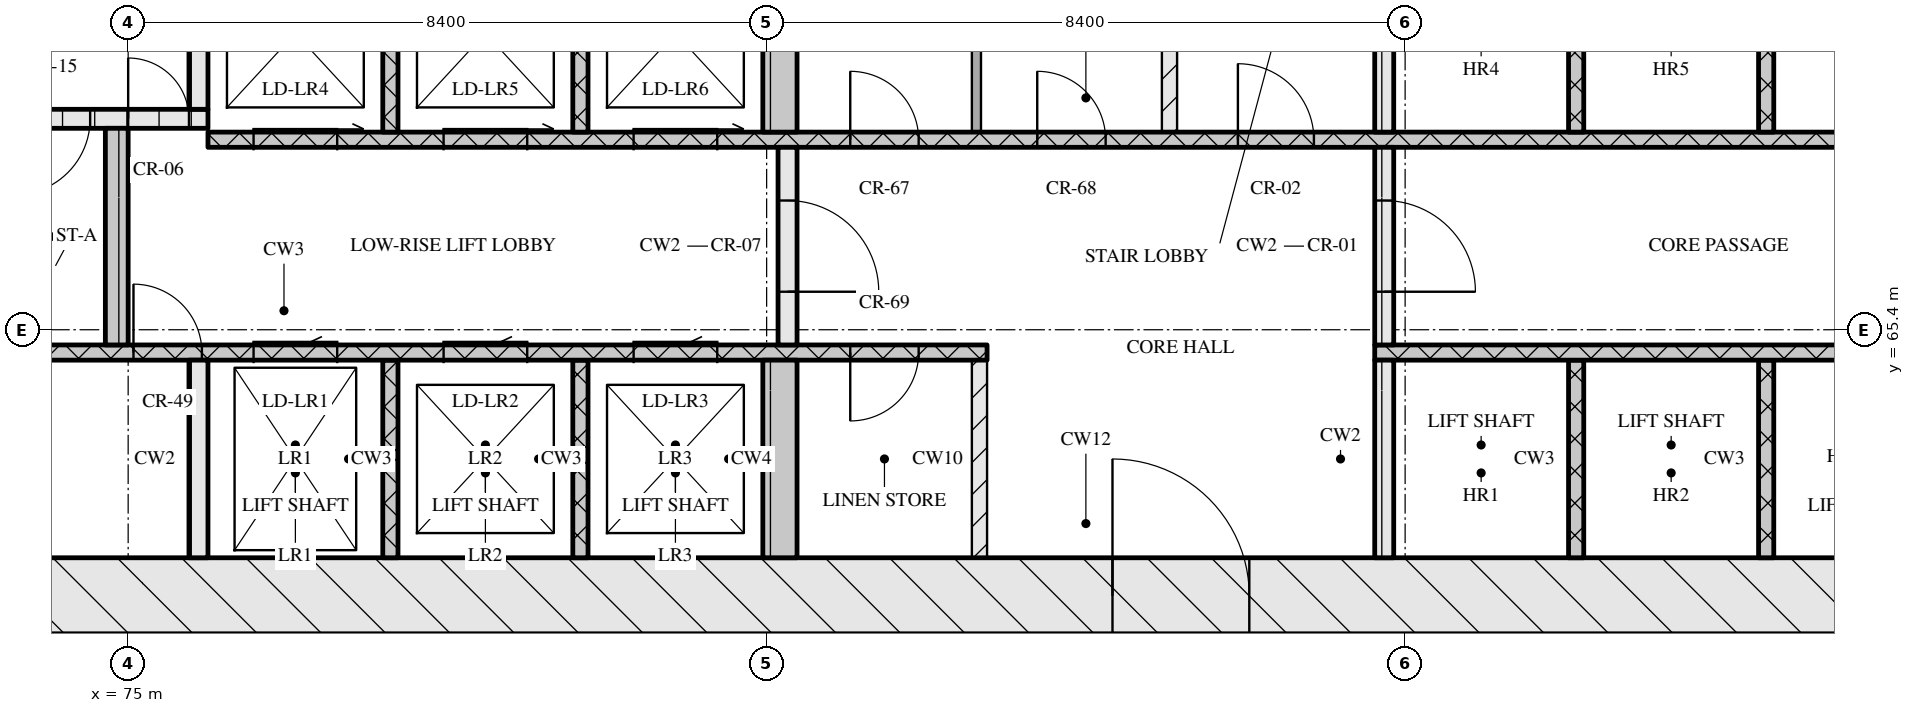
"""IFC4 building model, lengths in metres.
Left out: names, types, materials, properties, quantities, classifications, styles, units other than length and angle.
Written with IfcOpenShell. Run it as: python <this file> out.ifc"""

import sys

from ifc_helpers import new_model, si_unit, direction, frame, frame_2d, origin, place, context, subcontext, project, spatial, rectangle, extrude, element, fill, save


model = new_model("IFC4")
c1 = context("Model", 3, precision=1e-05, world=origin(), true_north=direction((0.0, 1.0)))
c2 = subcontext(c1, "Body", "Model", "MODEL_VIEW")
j1 = project(units=[si_unit("LENGTHUNIT", "METRE"), si_unit("PLANEANGLEUNIT", "RADIAN")], contexts=[c1])
p1 = place(None, origin())
s1 = spatial("IfcSite", under=j1, at=p1, CompositionType="ELEMENT")
p2 = place(p1, origin())
s2 = spatial("IfcBuilding", under=s1, at=p2, CompositionType="ELEMENT")
p3 = place(p2, frame((0.0, 0.0, 84.0)))
s3 = spatial("IfcBuildingStorey", under=s2, at=p3, CompositionType="ELEMENT", Elevation=84.0)
p4 = place(p3, frame((66.8, 61.9, 0.0), z_axis=(0.0, 0.0, 1.0), x_axis=(1.0, 0.0, 0.0)))
e1 = element("IfcWall", 1, at=p4, inside=s3, PredefinedType="SOLIDWALL", context=c2, shape_type="SweptSolid", body=[
    extrude(rectangle(XDim=41.6, YDim=1.0, at=frame_2d((20.8, 0.0))), origin(), (0.0, 0.0, 1.0), 10.97),
])
p5 = place(p4, frame((21.15, 0.0, 0.0)))
e2 = element("IfcOpeningElement", 2, at=p5, cuts=e1, PredefinedType="OPENING", context=c2, shape_type="SweptSolid", body=[
    extrude(rectangle(XDim=1.8, YDim=2.1, at=frame_2d((0.9, 1.05))), frame((0.0, 0.51, 0.0), z_axis=(0.0, -1.0, 0.0), x_axis=(1.0, 0.0, 0.0)), (0.0, 0.0, 1.0), 1.02),
])
p6 = place(p3, frame((75.925, 62.4, 0.0), z_axis=(0.0, 0.0, 1.0), x_axis=(0.0, 1.0, 0.0)))
e3 = element("IfcWall", 3, at=p6, inside=s3, PredefinedType="SOLIDWALL", context=c2, shape_type="SweptSolid", body=[
    extrude(rectangle(XDim=2.6, YDim=0.25, at=frame_2d((1.3, 0.0))), origin(), (0.0, 0.0, 1.0), 10.97),
])
for number, where, z_axis, x_axis in (
    (4, (78.45, 62.4, 0.0), (0.0, 0.0, 1.0), (0.0, 1.0, 0.0)),
    (5, (80.95, 62.4, 0.0), (0.0, 0.0, 1.0), (0.0, 1.0, 0.0)),
):
    element("IfcWall", number, at=place(p3, frame(where, z_axis=z_axis, x_axis=x_axis)), inside=s3, PredefinedType="SOLIDWALL", context=c2, shape_type="SweptSolid", body=[
        extrude(rectangle(XDim=2.6, YDim=0.2, at=frame_2d((1.3, 0.0))), origin(), (0.0, 0.0, 1.0), 10.97),
    ])
p7 = place(p3, frame((83.575, 62.4, 0.0), z_axis=(0.0, 0.0, 1.0), x_axis=(0.0, 1.0, 0.0)))
e6 = element("IfcWall", 6, at=p7, inside=s3, PredefinedType="SOLIDWALL", context=c2, shape_type="SweptSolid", body=[
    extrude(rectangle(XDim=2.6, YDim=0.45, at=frame_2d((1.3, 0.0))), origin(), (0.0, 0.0, 1.0), 10.97),
])
p8 = place(p3, frame((86.2, 62.4, 0.0), z_axis=(0.0, 0.0, 1.0), x_axis=(0.0, 1.0, 0.0)))
e7 = element("IfcWall", 7, at=p8, inside=s3, PredefinedType="PARTITIONING", context=c2, shape_type="SweptSolid", body=[
    extrude(rectangle(XDim=2.6, YDim=0.2, at=frame_2d((1.3, 0.0))), origin(), (0.0, 0.0, 1.0), 10.97),
])
p9 = place(p3, frame((91.525, 62.4, 0.0), z_axis=(0.0, 0.0, 1.0), x_axis=(0.0, 1.0, 0.0)))
e8 = element("IfcWall", 8, at=p9, inside=s3, PredefinedType="SOLIDWALL", context=c2, shape_type="SweptSolid", body=[
    extrude(rectangle(XDim=2.6, YDim=0.25, at=frame_2d((1.3, 0.0))), origin(), (0.0, 0.0, 1.0), 10.97),
])
for number, where, z_axis, x_axis in (
    (9, (94.05, 62.4, 0.0), (0.0, 0.0, 1.0), (0.0, 1.0, 0.0)),
    (10, (96.55, 62.4, 0.0), (0.0, 0.0, 1.0), (0.0, 1.0, 0.0)),
):
    element("IfcWall", number, at=place(p3, frame(where, z_axis=z_axis, x_axis=x_axis)), inside=s3, PredefinedType="SOLIDWALL", context=c2, shape_type="SweptSolid", body=[
        extrude(rectangle(XDim=2.6, YDim=0.2, at=frame_2d((1.3, 0.0))), origin(), (0.0, 0.0, 1.0), 10.97),
    ])
p10 = place(p3, frame((67.8, 65.1, 0.0), z_axis=(0.0, 0.0, 1.0), x_axis=(1.0, 0.0, 0.0)))
e11 = element("IfcWall", 11, at=p10, inside=s3, PredefinedType="SOLIDWALL", context=c2, shape_type="SweptSolid", body=[
    extrude(rectangle(XDim=18.5, YDim=0.2, at=frame_2d((9.25, 0.0))), origin(), (0.0, 0.0, 1.0), 10.97),
])
p11 = place(p10, frame((7.27, 0.0, 0.0)))
e12 = element("IfcOpeningElement", 12, at=p11, cuts=e11, PredefinedType="OPENING", context=c2, shape_type="SweptSolid", body=[
    extrude(rectangle(XDim=0.9, YDim=2.1, at=frame_2d((0.45, 1.05))), frame((0.0, 0.11, 0.0), z_axis=(0.0, -1.0, 0.0), x_axis=(1.0, 0.0, 0.0)), (0.0, 0.0, 1.0), 0.22),
])
p12 = place(p10, frame((8.85, 0.0, 0.0)))
e13 = element("IfcOpeningElement", 13, at=p12, cuts=e11, PredefinedType="OPENING", context=c2, shape_type="SweptSolid", body=[
    extrude(rectangle(XDim=1.1, YDim=2.1, at=frame_2d((0.55, 1.05))), frame((0.0, 0.11, 0.0), z_axis=(0.0, -1.0, 0.0), x_axis=(1.0, 0.0, 0.0)), (0.0, 0.0, 1.0), 0.22),
])
p13 = place(p10, frame((11.35, 0.0, 0.0)))
e14 = element("IfcOpeningElement", 14, at=p13, cuts=e11, PredefinedType="OPENING", context=c2, shape_type="SweptSolid", body=[
    extrude(rectangle(XDim=1.1, YDim=2.1, at=frame_2d((0.55, 1.05))), frame((0.0, 0.11, 0.0), z_axis=(0.0, -1.0, 0.0), x_axis=(1.0, 0.0, 0.0)), (0.0, 0.0, 1.0), 0.22),
])
p14 = place(p10, frame((13.85, 0.0, 0.0)))
e15 = element("IfcOpeningElement", 15, at=p14, cuts=e11, PredefinedType="OPENING", context=c2, shape_type="SweptSolid", body=[
    extrude(rectangle(XDim=1.1, YDim=2.1, at=frame_2d((0.55, 1.05))), frame((0.0, 0.11, 0.0), z_axis=(0.0, -1.0, 0.0), x_axis=(1.0, 0.0, 0.0)), (0.0, 0.0, 1.0), 0.22),
])
p15 = place(p10, frame((16.7, 0.0, 0.0)))
e16 = element("IfcOpeningElement", 16, at=p15, cuts=e11, PredefinedType="OPENING", context=c2, shape_type="SweptSolid", body=[
    extrude(rectangle(XDim=0.9, YDim=2.1, at=frame_2d((0.45, 1.05))), frame((0.0, 0.11, 0.0), z_axis=(0.0, -1.0, 0.0), x_axis=(1.0, 0.0, 0.0)), (0.0, 0.0, 1.0), 0.22),
])
p16 = place(p3, frame((91.4, 65.1, 0.0), z_axis=(0.0, 0.0, 1.0), x_axis=(1.0, 0.0, 0.0)))
e17 = element("IfcWall", 17, at=p16, inside=s3, PredefinedType="SOLIDWALL", context=c2, shape_type="SweptSolid", body=[
    extrude(rectangle(XDim=16.0, YDim=0.2, at=frame_2d((8.0, 0.0))), origin(), (0.0, 0.0, 1.0), 10.97),
])
p17 = place(p16, frame((7.83, 0.0, 0.0)))
e18 = element("IfcOpeningElement", 18, at=p17, cuts=e17, PredefinedType="OPENING", context=c2, shape_type="SweptSolid", body=[
    extrude(rectangle(XDim=0.9, YDim=2.1, at=frame_2d((0.45, 1.05))), frame((0.0, 0.11, 0.0), z_axis=(0.0, -1.0, 0.0), x_axis=(1.0, 0.0, 0.0)), (0.0, 0.0, 1.0), 0.22),
])
p18 = place(p3, frame((74.85, 65.2, 0.0), z_axis=(0.0, 0.0, 1.0), x_axis=(0.0, 1.0, 0.0)))
e19 = element("IfcWall", 19, at=p18, inside=s3, PredefinedType="SOLIDWALL", context=c2, shape_type="SweptSolid", body=[
    extrude(rectangle(XDim=2.85, YDim=0.3, at=frame_2d((1.425, 0.0))), origin(), (0.0, 0.0, 1.0), 10.97),
])
p19 = place(p3, frame((83.675, 65.2, 0.0), z_axis=(0.0, 0.0, 1.0), x_axis=(0.0, 1.0, 0.0)))
e20 = element("IfcWall", 20, at=p19, inside=s3, PredefinedType="SOLIDWALL", context=c2, shape_type="SweptSolid", body=[
    extrude(rectangle(XDim=2.6, YDim=0.25, at=frame_2d((1.3, 0.0))), origin(), (0.0, 0.0, 1.0), 10.97),
])
p20 = place(p19, frame((0.7, 0.0, 0.0)))
e21 = element("IfcOpeningElement", 21, at=p20, cuts=e20, PredefinedType="OPENING", context=c2, shape_type="SweptSolid", body=[
    extrude(rectangle(XDim=1.2, YDim=2.1, at=frame_2d((0.6, 1.05))), frame((0.0, 0.135, 0.0), z_axis=(0.0, -1.0, 0.0), x_axis=(1.0, 0.0, 0.0)), (0.0, 0.0, 1.0), 0.27),
])
p21 = place(p3, frame((91.525, 65.2, 0.0), z_axis=(0.0, 0.0, 1.0), x_axis=(0.0, 1.0, 0.0)))
e22 = element("IfcWall", 22, at=p21, inside=s3, PredefinedType="SOLIDWALL", context=c2, shape_type="SweptSolid", body=[
    extrude(rectangle(XDim=2.6, YDim=0.25, at=frame_2d((1.3, 0.0))), origin(), (0.0, 0.0, 1.0), 10.97),
])
p22 = place(p21, frame((0.7, 0.0, 0.0)))
e23 = element("IfcOpeningElement", 23, at=p22, cuts=e22, PredefinedType="OPENING", context=c2, shape_type="SweptSolid", body=[
    extrude(rectangle(XDim=1.2, YDim=2.1, at=frame_2d((0.6, 1.05))), frame((0.0, 0.135, 0.0), z_axis=(0.0, -1.0, 0.0), x_axis=(1.0, 0.0, 0.0)), (0.0, 0.0, 1.0), 0.27),
])
p23 = place(p3, frame((76.05, 67.9, 0.0), z_axis=(0.0, 0.0, 1.0), x_axis=(1.0, 0.0, 0.0)))
e24 = element("IfcWall", 24, at=p23, inside=s3, PredefinedType="SOLIDWALL", context=c2, shape_type="SweptSolid", body=[
    extrude(rectangle(XDim=23.1, YDim=0.2, at=frame_2d((11.55, 0.0))), origin(), (0.0, 0.0, 1.0), 10.97),
])
p24 = place(p23, frame((0.6, 0.0, 0.0)))
e25 = element("IfcOpeningElement", 25, at=p24, cuts=e24, PredefinedType="OPENING", context=c2, shape_type="SweptSolid", body=[
    extrude(rectangle(XDim=1.1, YDim=2.1, at=frame_2d((0.55, 1.05))), frame((0.0, 0.11, 0.0), z_axis=(0.0, -1.0, 0.0), x_axis=(1.0, 0.0, 0.0)), (0.0, 0.0, 1.0), 0.22),
])
p25 = place(p23, frame((3.1, 0.0, 0.0)))
e26 = element("IfcOpeningElement", 26, at=p25, cuts=e24, PredefinedType="OPENING", context=c2, shape_type="SweptSolid", body=[
    extrude(rectangle(XDim=1.1, YDim=2.1, at=frame_2d((0.55, 1.05))), frame((0.0, 0.11, 0.0), z_axis=(0.0, -1.0, 0.0), x_axis=(1.0, 0.0, 0.0)), (0.0, 0.0, 1.0), 0.22),
])
p26 = place(p23, frame((5.6, 0.0, 0.0)))
e27 = element("IfcOpeningElement", 27, at=p26, cuts=e24, PredefinedType="OPENING", context=c2, shape_type="SweptSolid", body=[
    extrude(rectangle(XDim=1.1, YDim=2.1, at=frame_2d((0.55, 1.05))), frame((0.0, 0.11, 0.0), z_axis=(0.0, -1.0, 0.0), x_axis=(1.0, 0.0, 0.0)), (0.0, 0.0, 1.0), 0.22),
])
p27 = place(p23, frame((8.45, 0.0, 0.0)))
e28 = element("IfcOpeningElement", 28, at=p27, cuts=e24, PredefinedType="OPENING", context=c2, shape_type="SweptSolid", body=[
    extrude(rectangle(XDim=0.9, YDim=2.1, at=frame_2d((0.45, 1.05))), frame((0.0, 0.11, 0.0), z_axis=(0.0, -1.0, 0.0), x_axis=(1.0, 0.0, 0.0)), (0.0, 0.0, 1.0), 0.22),
])
p28 = place(p23, frame((10.91, 0.0, 0.0)))
e29 = element("IfcOpeningElement", 29, at=p28, cuts=e24, PredefinedType="OPENING", context=c2, shape_type="SweptSolid", body=[
    extrude(rectangle(XDim=0.9, YDim=2.1, at=frame_2d((0.45, 1.05))), frame((0.0, 0.11, 0.0), z_axis=(0.0, -1.0, 0.0), x_axis=(1.0, 0.0, 0.0)), (0.0, 0.0, 1.0), 0.22),
])
p29 = place(p23, frame((13.55, 0.0, 0.0)))
e30 = element("IfcOpeningElement", 30, at=p29, cuts=e24, PredefinedType="OPENING", context=c2, shape_type="SweptSolid", body=[
    extrude(rectangle(XDim=1.0, YDim=2.1, at=frame_2d((0.5, 1.05))), frame((0.0, 0.11, 0.0), z_axis=(0.0, -1.0, 0.0), x_axis=(1.0, 0.0, 0.0)), (0.0, 0.0, 1.0), 0.22),
])
for number, where, z_axis, x_axis in (
    (31, (78.45, 68.0, 0.0), (0.0, 0.0, 1.0), (0.0, 1.0, 0.0)),
    (32, (80.95, 68.0, 0.0), (0.0, 0.0, 1.0), (0.0, 1.0, 0.0)),
):
    element("IfcWall", number, at=place(p3, frame(where, z_axis=z_axis, x_axis=x_axis)), inside=s3, PredefinedType="SOLIDWALL", context=c2, shape_type="SweptSolid", body=[
        extrude(rectangle(XDim=2.6, YDim=0.2, at=frame_2d((1.3, 0.0))), origin(), (0.0, 0.0, 1.0), 10.97),
    ])
p30 = place(p3, frame((83.575, 68.0, 0.0), z_axis=(0.0, 0.0, 1.0), x_axis=(0.0, 1.0, 0.0)))
e33 = element("IfcWall", 33, at=p30, inside=s3, PredefinedType="SOLIDWALL", context=c2, shape_type="SweptSolid", body=[
    extrude(rectangle(XDim=2.6, YDim=0.45, at=frame_2d((1.3, 0.0))), origin(), (0.0, 0.0, 1.0), 10.97),
])
p31 = place(p3, frame((86.16, 68.0, 0.0), z_axis=(0.0, 0.0, 1.0), x_axis=(0.0, 1.0, 0.0)))
e34 = element("IfcWall", 34, at=p31, inside=s3, PredefinedType="PARTITIONING", context=c2, shape_type="SweptSolid", body=[
    extrude(rectangle(XDim=2.6, YDim=0.12, at=frame_2d((1.3, 0.0))), origin(), (0.0, 0.0, 1.0), 10.97),
])
p32 = place(p3, frame((88.7, 68.0, 0.0), z_axis=(0.0, 0.0, 1.0), x_axis=(0.0, 1.0, 0.0)))
e35 = element("IfcWall", 35, at=p32, inside=s3, PredefinedType="PARTITIONING", context=c2, shape_type="SweptSolid", body=[
    extrude(rectangle(XDim=2.6, YDim=0.2, at=frame_2d((1.3, 0.0))), origin(), (0.0, 0.0, 1.0), 10.97),
])
p33 = place(p3, frame((91.525, 68.0, 0.0), z_axis=(0.0, 0.0, 1.0), x_axis=(0.0, 1.0, 0.0)))
e36 = element("IfcWall", 36, at=p33, inside=s3, PredefinedType="SOLIDWALL", context=c2, shape_type="SweptSolid", body=[
    extrude(rectangle(XDim=2.6, YDim=0.25, at=frame_2d((1.3, 0.0))), origin(), (0.0, 0.0, 1.0), 10.97),
])
for number, where, z_axis, x_axis in (
    (37, (94.05, 68.0, 0.0), (0.0, 0.0, 1.0), (0.0, 1.0, 0.0)),
    (38, (96.55, 68.0, 0.0), (0.0, 0.0, 1.0), (0.0, 1.0, 0.0)),
):
    element("IfcWall", number, at=place(p3, frame(where, z_axis=z_axis, x_axis=x_axis)), inside=s3, PredefinedType="SOLIDWALL", context=c2, shape_type="SweptSolid", body=[
        extrude(rectangle(XDim=2.6, YDim=0.2, at=frame_2d((1.3, 0.0))), origin(), (0.0, 0.0, 1.0), 10.97),
    ])
p34 = place(p3, frame((67.8, 68.175, 0.0), z_axis=(0.0, 0.0, 1.0), x_axis=(1.0, 0.0, 0.0)))
e39 = element("IfcWall", 39, at=p34, inside=s3, PredefinedType="SOLIDWALL", context=c2, shape_type="SweptSolid", body=[
    extrude(rectangle(XDim=8.25, YDim=0.25, at=frame_2d((4.125, 0.0))), origin(), (0.0, 0.0, 1.0), 10.97),
])
p35 = place(p34, frame((5.7, 0.0, 0.0)))
e40 = element("IfcOpeningElement", 40, at=p35, cuts=e39, PredefinedType="OPENING", context=c2, shape_type="SweptSolid", body=[
    extrude(rectangle(XDim=1.0, YDim=2.1, at=frame_2d((0.5, 1.05))), frame((0.0, 0.135, 0.0), z_axis=(0.0, -1.0, 0.0), x_axis=(1.0, 0.0, 0.0)), (0.0, 0.0, 1.0), 0.27),
])
p36 = place(p34, frame((7.2, 0.0, 0.0)))
e41 = element("IfcOpeningElement", 41, at=p36, cuts=e39, PredefinedType="OPENING", context=c2, shape_type="SweptSolid", body=[
    extrude(rectangle(XDim=0.8, YDim=2.1, at=frame_2d((0.4, 1.05))), frame((0.0, 0.135, 0.0), z_axis=(0.0, -1.0, 0.0), x_axis=(1.0, 0.0, 0.0)), (0.0, 0.0, 1.0), 0.27),
])
p37 = place(p3, frame((75.925, 68.3, 0.0), z_axis=(0.0, 0.0, 1.0), x_axis=(0.0, 1.0, 0.0)))
e42 = element("IfcWall", 42, at=p37, inside=s3, PredefinedType="SOLIDWALL", context=c2, shape_type="SweptSolid", body=[
    extrude(rectangle(XDim=2.3, YDim=0.25, at=frame_2d((1.15, 0.0))), origin(), (0.0, 0.0, 1.0), 10.97),
])
p38 = place(p5, origin())
e43 = element("IfcDoor", 43, at=p38, inside=s3, OperationType="DOUBLE_DOOR_SINGLE_SWING", PredefinedType="DOOR", context=c2, shape_type="SweptSolid", body=[
    extrude(rectangle(XDim=1.8, YDim=2.1, at=frame_2d((0.9, 1.05))), frame((0.0, 0.025, 0.0), z_axis=(0.0, -1.0, 0.0), x_axis=(1.0, 0.0, 0.0)), (0.0, 0.0, 1.0), 0.05),
])
fill(e2, e43)
p39 = place(p11, origin())
e44 = element("IfcDoor", 44, at=p39, inside=s3, OperationType="SINGLE_SWING_LEFT", PredefinedType="DOOR", context=c2, shape_type="SweptSolid", body=[
    extrude(rectangle(XDim=0.9, YDim=2.1, at=frame_2d((0.45, 1.05))), frame((0.0, 0.025, 0.0), z_axis=(0.0, -1.0, 0.0), x_axis=(1.0, 0.0, 0.0)), (0.0, 0.0, 1.0), 0.05),
])
fill(e12, e44)
p40 = place(p12, origin())
e45 = element("IfcDoor", 45, at=p40, inside=s3, OperationType="SLIDING_TO_LEFT", PredefinedType="DOOR", context=c2, shape_type="SweptSolid", body=[
    extrude(rectangle(XDim=1.1, YDim=2.1, at=frame_2d((0.55, 1.05))), frame((0.0, 0.025, 0.0), z_axis=(0.0, -1.0, 0.0), x_axis=(1.0, 0.0, 0.0)), (0.0, 0.0, 1.0), 0.05),
])
fill(e13, e45)
p41 = place(p13, origin())
e46 = element("IfcDoor", 46, at=p41, inside=s3, OperationType="SLIDING_TO_LEFT", PredefinedType="DOOR", context=c2, shape_type="SweptSolid", body=[
    extrude(rectangle(XDim=1.1, YDim=2.1, at=frame_2d((0.55, 1.05))), frame((0.0, 0.025, 0.0), z_axis=(0.0, -1.0, 0.0), x_axis=(1.0, 0.0, 0.0)), (0.0, 0.0, 1.0), 0.05),
])
fill(e14, e46)
p42 = place(p14, origin())
e47 = element("IfcDoor", 47, at=p42, inside=s3, OperationType="SLIDING_TO_LEFT", PredefinedType="DOOR", context=c2, shape_type="SweptSolid", body=[
    extrude(rectangle(XDim=1.1, YDim=2.1, at=frame_2d((0.55, 1.05))), frame((0.0, 0.025, 0.0), z_axis=(0.0, -1.0, 0.0), x_axis=(1.0, 0.0, 0.0)), (0.0, 0.0, 1.0), 0.05),
])
fill(e15, e47)
p43 = place(p15, origin())
e48 = element("IfcDoor", 48, at=p43, inside=s3, OperationType="SINGLE_SWING_RIGHT", PredefinedType="DOOR", context=c2, shape_type="SweptSolid", body=[
    extrude(rectangle(XDim=0.9, YDim=2.1, at=frame_2d((0.45, 1.05))), frame((0.0, 0.025, 0.0), z_axis=(0.0, -1.0, 0.0), x_axis=(1.0, 0.0, 0.0)), (0.0, 0.0, 1.0), 0.05),
])
fill(e16, e48)
p44 = place(p20, origin())
e49 = element("IfcDoor", 49, at=p44, inside=s3, OperationType="SINGLE_SWING_RIGHT", PredefinedType="DOOR", context=c2, shape_type="SweptSolid", body=[
    extrude(rectangle(XDim=1.2, YDim=2.1, at=frame_2d((0.6, 1.05))), frame((0.0, 0.025, 0.0), z_axis=(0.0, -1.0, 0.0), x_axis=(1.0, 0.0, 0.0)), (0.0, 0.0, 1.0), 0.05),
])
fill(e21, e49)
p45 = place(p22, origin())
e50 = element("IfcDoor", 50, at=p45, inside=s3, OperationType="SINGLE_SWING_RIGHT", PredefinedType="DOOR", context=c2, shape_type="SweptSolid", body=[
    extrude(rectangle(XDim=1.2, YDim=2.1, at=frame_2d((0.6, 1.05))), frame((0.0, 0.025, 0.0), z_axis=(0.0, -1.0, 0.0), x_axis=(1.0, 0.0, 0.0)), (0.0, 0.0, 1.0), 0.05),
])
fill(e23, e50)
p46 = place(p24, origin())
e51 = element("IfcDoor", 51, at=p46, inside=s3, OperationType="SLIDING_TO_RIGHT", PredefinedType="DOOR", context=c2, shape_type="SweptSolid", body=[
    extrude(rectangle(XDim=1.1, YDim=2.1, at=frame_2d((0.55, 1.05))), frame((0.0, 0.025, 0.0), z_axis=(0.0, -1.0, 0.0), x_axis=(1.0, 0.0, 0.0)), (0.0, 0.0, 1.0), 0.05),
])
fill(e25, e51)
p47 = place(p25, origin())
e52 = element("IfcDoor", 52, at=p47, inside=s3, OperationType="SLIDING_TO_RIGHT", PredefinedType="DOOR", context=c2, shape_type="SweptSolid", body=[
    extrude(rectangle(XDim=1.1, YDim=2.1, at=frame_2d((0.55, 1.05))), frame((0.0, 0.025, 0.0), z_axis=(0.0, -1.0, 0.0), x_axis=(1.0, 0.0, 0.0)), (0.0, 0.0, 1.0), 0.05),
])
fill(e26, e52)
p48 = place(p26, origin())
e53 = element("IfcDoor", 53, at=p48, inside=s3, OperationType="SLIDING_TO_RIGHT", PredefinedType="DOOR", context=c2, shape_type="SweptSolid", body=[
    extrude(rectangle(XDim=1.1, YDim=2.1, at=frame_2d((0.55, 1.05))), frame((0.0, 0.025, 0.0), z_axis=(0.0, -1.0, 0.0), x_axis=(1.0, 0.0, 0.0)), (0.0, 0.0, 1.0), 0.05),
])
fill(e27, e53)
p49 = place(p27, origin())
e54 = element("IfcDoor", 54, at=p49, inside=s3, OperationType="SINGLE_SWING_LEFT", PredefinedType="DOOR", context=c2, shape_type="SweptSolid", body=[
    extrude(rectangle(XDim=0.9, YDim=2.1, at=frame_2d((0.45, 1.05))), frame((0.0, 0.025, 0.0), z_axis=(0.0, -1.0, 0.0), x_axis=(1.0, 0.0, 0.0)), (0.0, 0.0, 1.0), 0.05),
])
fill(e28, e54)
p50 = place(p28, origin())
e55 = element("IfcDoor", 55, at=p50, inside=s3, OperationType="SINGLE_SWING_LEFT", PredefinedType="DOOR", context=c2, shape_type="SweptSolid", body=[
    extrude(rectangle(XDim=0.9, YDim=2.1, at=frame_2d((0.45, 1.05))), frame((0.0, 0.025, 0.0), z_axis=(0.0, -1.0, 0.0), x_axis=(1.0, 0.0, 0.0)), (0.0, 0.0, 1.0), 0.05),
])
fill(e29, e55)
p51 = place(p29, origin())
e56 = element("IfcDoor", 56, at=p51, inside=s3, OperationType="SINGLE_SWING_LEFT", PredefinedType="DOOR", context=c2, shape_type="SweptSolid", body=[
    extrude(rectangle(XDim=1.0, YDim=2.1, at=frame_2d((0.5, 1.05))), frame((0.0, 0.025, 0.0), z_axis=(0.0, -1.0, 0.0), x_axis=(1.0, 0.0, 0.0)), (0.0, 0.0, 1.0), 0.05),
])
fill(e30, e56)
p52 = place(p35, origin())
e57 = element("IfcDoor", 57, at=p52, inside=s3, OperationType="SINGLE_SWING_RIGHT", PredefinedType="DOOR", context=c2, shape_type="SweptSolid", body=[
    extrude(rectangle(XDim=1.0, YDim=2.1, at=frame_2d((0.5, 1.05))), frame((0.0, 0.025, 0.0), z_axis=(0.0, -1.0, 0.0), x_axis=(1.0, 0.0, 0.0)), (0.0, 0.0, 1.0), 0.05),
])
fill(e40, e57)
p53 = place(p36, origin())
e58 = element("IfcDoor", 58, at=p53, inside=s3, OperationType="SINGLE_SWING_LEFT", PredefinedType="DOOR", context=c2, shape_type="SweptSolid", body=[
    extrude(rectangle(XDim=0.8, YDim=2.1, at=frame_2d((0.4, 1.05))), frame((0.0, 0.025, 0.0), z_axis=(0.0, -1.0, 0.0), x_axis=(1.0, 0.0, 0.0)), (0.0, 0.0, 1.0), 0.05),
])
fill(e41, e58)
save(model, sys.argv[1])
